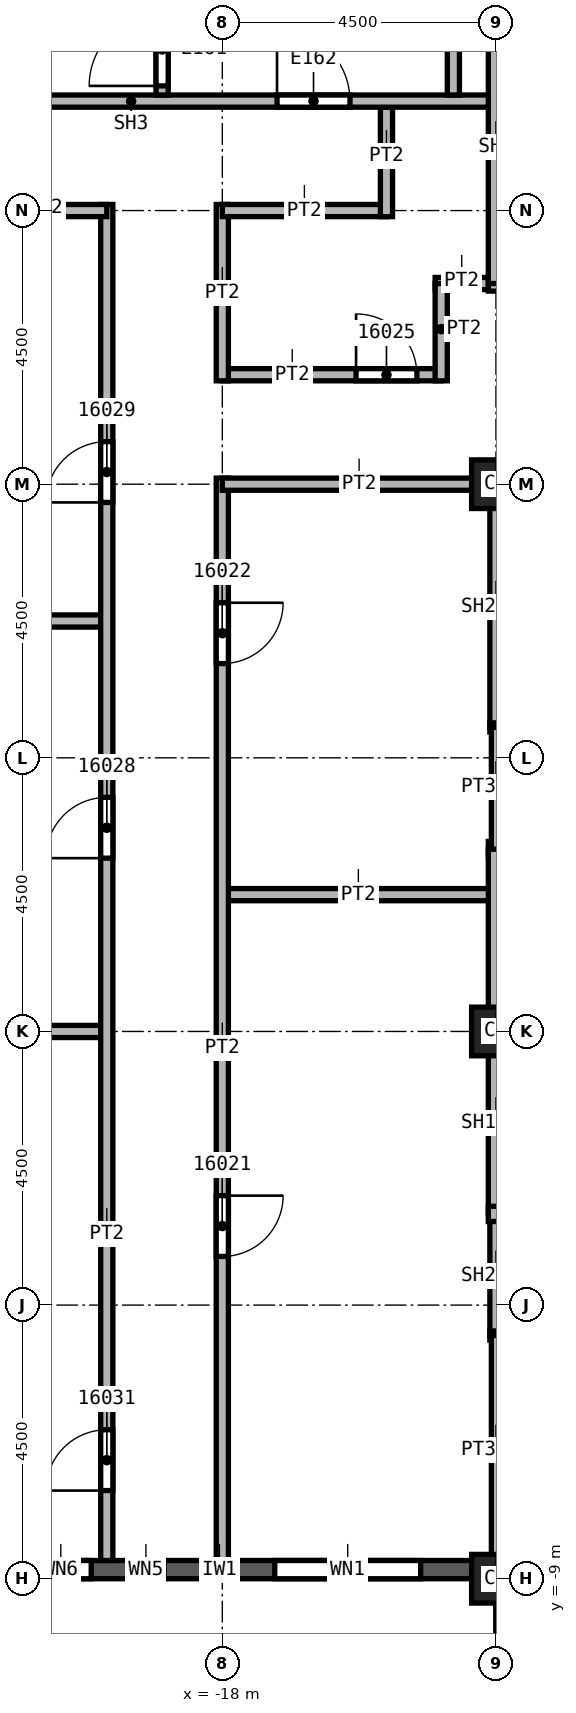
"""IFC4 building model, lengths in metres.
Left out: names, types, materials, properties, quantities, classifications, styles, units other than length and angle.
Written with IfcOpenShell. Run it as: python <this file> out.ifc"""

import sys

from ifc_helpers import new_model, si_unit, direction, frame, frame_2d, origin, origin_2d, place, context, subcontext, project, spatial, rectangle, extrude, element, fill, save


model = new_model("IFC4")
c1 = context("Model", 3, precision=1e-05, world=origin(), true_north=direction((0.0, 1.0)))
c2 = subcontext(c1, "Body", "Model", "MODEL_VIEW")
j1 = project(units=[si_unit("LENGTHUNIT", "METRE"), si_unit("PLANEANGLEUNIT", "RADIAN")], contexts=[c1])
p1 = place(None, origin())
s1 = spatial("IfcSite", under=j1, at=p1, CompositionType="ELEMENT")
p2 = place(p1, origin())
s2 = spatial("IfcBuilding", under=s1, at=p2, CompositionType="ELEMENT")
p3 = place(p2, frame((0.0, 0.0, 242.0)))
s3 = spatial("IfcBuildingStorey", under=s2, at=p3, CompositionType="ELEMENT", Elevation=242.0)
for number, where, z_axis, x_axis in (
    (1, (-13.5, 0.0, 0.0), (0.0, 0.0, 1.0), (1.0, 0.0, 0.0)),
    (2, (-13.5, 9.0, 0.0), (0.0, 0.0, 1.0), (1.0, 0.0, 0.0)),
    (3, (-13.5, -9.0, 0.0), (0.0, 0.0, 1.0), (1.0, 0.0, 0.0)),
):
    element("IfcColumn", number, at=place(p3, frame(where, z_axis=z_axis, x_axis=x_axis)), inside=s3, PredefinedType="COLUMN", context=c2, shape_type="SweptSolid", body=[
        extrude(rectangle(XDim=0.8, YDim=0.8, at=origin_2d()), origin(), (0.0, 0.0, 1.0), 3.72),
    ])
p4 = place(p3, frame((-13.35, -9.025, 0.0), z_axis=(0.0, 0.0, 1.0), x_axis=(0.0, -1.0, 0.0)))
e4 = element("IfcWall", 4, at=p4, inside=s3, PredefinedType="SOLIDWALL", context=c2, shape_type="SweptSolid", body=[
    extrude(rectangle(XDim=8.525, YDim=0.3, at=frame_2d((4.263, 0.0))), origin(), (0.0, 0.0, 1.0), 3.12),
])
p5 = place(p4, frame((0.462, 0.0, 0.8)))
e5 = element("IfcOpeningElement", 5, at=p5, cuts=e4, PredefinedType="OPENING", context=c2, shape_type="SweptSolid", body=[
    extrude(rectangle(XDim=2.4, YDim=1.95, at=frame_2d((1.2, 0.975))), frame((0.0, 0.15, 0.0), z_axis=(0.0, -1.0, 0.0), x_axis=(1.0, 0.0, 0.0)), (0.0, 0.0, 1.0), 0.3),
])
p6 = place(p4, frame((4.538, 0.0, 0.8)))
e6 = element("IfcOpeningElement", 6, at=p6, cuts=e4, PredefinedType="OPENING", context=c2, shape_type="SweptSolid", body=[
    extrude(rectangle(XDim=2.4, YDim=1.95, at=frame_2d((1.2, 0.975))), frame((0.0, 0.15, 0.0), z_axis=(0.0, -1.0, 0.0), x_axis=(1.0, 0.0, 0.0)), (0.0, 0.0, 1.0), 0.3),
])
p7 = place(p3, frame((-22.05, -8.85, 0.0), z_axis=(0.0, 0.0, 1.0), x_axis=(1.0, 0.0, 0.0)))
e7 = element("IfcWall", 7, at=p7, inside=s3, PredefinedType="SOLIDWALL", context=c2, shape_type="SweptSolid", body=[
    extrude(rectangle(XDim=8.525, YDim=0.3, at=frame_2d((4.263, 0.0))), origin(), (0.0, 0.0, 1.0), 3.12),
])
p8 = place(p7, frame((4.913, 0.0, 0.8)))
e8 = element("IfcOpeningElement", 8, at=p8, cuts=e7, PredefinedType="OPENING", context=c2, shape_type="SweptSolid", body=[
    extrude(rectangle(XDim=2.4, YDim=1.95, at=frame_2d((1.2, 0.975))), frame((0.0, 0.15, 0.0), z_axis=(0.0, -1.0, 0.0), x_axis=(1.0, 0.0, 0.0)), (0.0, 0.0, 1.0), 0.3),
])
p9 = place(p7, frame((0.894, 0.0, 0.8)))
e9 = element("IfcOpeningElement", 9, at=p9, cuts=e7, PredefinedType="OPENING", context=c2, shape_type="SweptSolid", body=[
    extrude(rectangle(XDim=1.0, YDim=1.95, at=frame_2d((0.5, 0.975))), frame((0.0, 0.15, 0.0), z_axis=(0.0, -1.0, 0.0), x_axis=(1.0, 0.0, 0.0)), (0.0, 0.0, 1.0), 0.3),
])
p10 = place(p7, frame((2.494, 0.0, 0.8)))
e10 = element("IfcOpeningElement", 10, at=p10, cuts=e7, PredefinedType="OPENING", context=c2, shape_type="SweptSolid", body=[
    extrude(rectangle(XDim=0.6, YDim=1.95, at=frame_2d((0.3, 0.975))), frame((0.0, 0.15, 0.0), z_axis=(0.0, -1.0, 0.0), x_axis=(1.0, 0.0, 0.0)), (0.0, 0.0, 1.0), 0.3),
])
p11 = place(p3, frame((-24.5, 6.75, 0.0), z_axis=(0.0, 0.0, 1.0), x_axis=(1.0, 0.0, 0.0)))
e11 = element("IfcWall", 11, at=p11, inside=s3, PredefinedType="PARTITIONING", context=c2, shape_type="SweptSolid", body=[
    extrude(rectangle(XDim=4.6, YDim=0.2, at=frame_2d((2.3, 0.0))), origin(), (0.0, 0.0, 1.0), 3.72),
])
p12 = place(p3, frame((-19.9, 0.0, 0.0), z_axis=(0.0, 0.0, 1.0), x_axis=(-1.0, 0.0, 0.0)))
e12 = element("IfcWall", 12, at=p12, inside=s3, PredefinedType="PARTITIONING", context=c2, shape_type="SweptSolid", body=[
    extrude(rectangle(XDim=6.65, YDim=0.2, at=frame_2d((3.325, 0.0))), origin(), (0.0, 0.0, 1.0), 3.72),
])
p13 = place(p3, frame((-19.9, -8.7, 0.0), z_axis=(0.0, 0.0, 1.0), x_axis=(0.0, 1.0, 0.0)))
e13 = element("IfcWall", 13, at=p13, inside=s3, PredefinedType="PARTITIONING", context=c2, shape_type="SweptSolid", body=[
    extrude(rectangle(XDim=22.3, YDim=0.2, at=frame_2d((11.15, 0.0))), origin(), (0.0, 0.0, 1.0), 3.72),
])
p14 = place(p13, frame((11.55, 0.0, 0.0)))
e14 = element("IfcOpeningElement", 14, at=p14, cuts=e13, PredefinedType="OPENING", context=c2, shape_type="SweptSolid", body=[
    extrude(rectangle(XDim=1.0, YDim=2.1, at=frame_2d((0.5, 1.05))), frame((0.0, 0.1, 0.0), z_axis=(0.0, -1.0, 0.0), x_axis=(1.0, 0.0, 0.0)), (0.0, 0.0, 1.0), 0.2),
])
p15 = place(p13, frame((17.4, 0.0, 0.0)))
e15 = element("IfcOpeningElement", 15, at=p15, cuts=e13, PredefinedType="OPENING", context=c2, shape_type="SweptSolid", body=[
    extrude(rectangle(XDim=1.0, YDim=2.1, at=frame_2d((0.5, 1.05))), frame((0.0, 0.1, 0.0), z_axis=(0.0, -1.0, 0.0), x_axis=(1.0, 0.0, 0.0)), (0.0, 0.0, 1.0), 0.2),
])
p16 = place(p13, frame((1.15, 0.0, 0.0)))
e16 = element("IfcOpeningElement", 16, at=p16, cuts=e13, PredefinedType="OPENING", context=c2, shape_type="SweptSolid", body=[
    extrude(rectangle(XDim=1.0, YDim=2.1, at=frame_2d((0.5, 1.05))), frame((0.0, 0.1, 0.0), z_axis=(0.0, -1.0, 0.0), x_axis=(1.0, 0.0, 0.0)), (0.0, 0.0, 1.0), 0.2),
])
p17 = place(p3, frame((-19.9, 13.5, 0.0), z_axis=(0.0, 0.0, 1.0), x_axis=(-1.0, 0.0, 0.0)))
e17 = element("IfcWall", 17, at=p17, inside=s3, PredefinedType="PARTITIONING", context=c2, shape_type="SweptSolid", body=[
    extrude(rectangle(XDim=2.1, YDim=0.2, at=frame_2d((1.05, 0.0))), origin(), (0.0, 0.0, 1.0), 3.72),
])
p18 = place(p3, frame((-18.0, 2.25, 0.0), z_axis=(0.0, 0.0, 1.0), x_axis=(1.0, 0.0, 0.0)))
e18 = element("IfcWall", 18, at=p18, inside=s3, PredefinedType="PARTITIONING", context=c2, shape_type="SweptSolid", body=[
    extrude(rectangle(XDim=4.5, YDim=0.2, at=frame_2d((2.25, 0.0))), origin(), (0.0, 0.0, 1.0), 3.72),
])
p19 = place(p3, frame((-18.0, 9.1, 0.0), z_axis=(0.0, 0.0, 1.0), x_axis=(0.0, -1.0, 0.0)))
e19 = element("IfcWall", 19, at=p19, inside=s3, PredefinedType="PARTITIONING", context=c2, shape_type="SweptSolid", body=[
    extrude(rectangle(XDim=17.8, YDim=0.2, at=frame_2d((8.9, 0.0))), origin(), (0.0, 0.0, 1.0), 3.72),
])
p20 = place(p19, frame((11.8, 0.0, 0.0)))
e20 = element("IfcOpeningElement", 20, at=p20, cuts=e19, PredefinedType="OPENING", context=c2, shape_type="SweptSolid", body=[
    extrude(rectangle(XDim=1.0, YDim=2.1, at=frame_2d((0.5, 1.05))), frame((0.0, 0.1, 0.0), z_axis=(0.0, -1.0, 0.0), x_axis=(1.0, 0.0, 0.0)), (0.0, 0.0, 1.0), 0.2),
])
p21 = place(p19, frame((2.05, 0.0, 0.0)))
e21 = element("IfcOpeningElement", 21, at=p21, cuts=e19, PredefinedType="OPENING", context=c2, shape_type="SweptSolid", body=[
    extrude(rectangle(XDim=1.0, YDim=2.1, at=frame_2d((0.5, 1.05))), frame((0.0, 0.1, 0.0), z_axis=(0.0, -1.0, 0.0), x_axis=(1.0, 0.0, 0.0)), (0.0, 0.0, 1.0), 0.2),
])
p22 = place(p3, frame((-18.0, 10.8, 0.0), z_axis=(0.0, 0.0, 1.0), x_axis=(1.0, 0.0, 0.0)))
e22 = element("IfcWall", 22, at=p22, inside=s3, PredefinedType="PARTITIONING", context=c2, shape_type="SweptSolid", body=[
    extrude(rectangle(XDim=3.6, YDim=0.2, at=frame_2d((1.8, 0.0))), origin(), (0.0, 0.0, 1.0), 3.72),
])
p23 = place(p22, frame((2.2, 0.0, 0.0)))
e23 = element("IfcOpeningElement", 23, at=p23, cuts=e22, PredefinedType="OPENING", context=c2, shape_type="SweptSolid", body=[
    extrude(rectangle(XDim=1.0, YDim=2.1, at=frame_2d((0.5, 1.05))), frame((0.0, 0.1, 0.0), z_axis=(0.0, -1.0, 0.0), x_axis=(1.0, 0.0, 0.0)), (0.0, 0.0, 1.0), 0.2),
])
p24 = place(p3, frame((-18.0, 13.6, 0.0), z_axis=(0.0, 0.0, 1.0), x_axis=(0.0, -1.0, 0.0)))
e24 = element("IfcWall", 24, at=p24, inside=s3, PredefinedType="PARTITIONING", context=c2, shape_type="SweptSolid", body=[
    extrude(rectangle(XDim=2.9, YDim=0.2, at=frame_2d((1.45, 0.0))), origin(), (0.0, 0.0, 1.0), 3.72),
])
p25 = place(p3, frame((-15.3, 13.5, 0.0), z_axis=(0.0, 0.0, 1.0), x_axis=(-1.0, 0.0, 0.0)))
e25 = element("IfcWall", 25, at=p25, inside=s3, PredefinedType="PARTITIONING", context=c2, shape_type="SweptSolid", body=[
    extrude(rectangle(XDim=2.7, YDim=0.2, at=frame_2d((1.35, 0.0))), origin(), (0.0, 0.0, 1.0), 3.72),
])
p26 = place(p3, frame((-15.3, 15.2, 0.0), z_axis=(0.0, 0.0, 1.0), x_axis=(0.0, -1.0, 0.0)))
e26 = element("IfcWall", 26, at=p26, inside=s3, PredefinedType="PARTITIONING", context=c2, shape_type="SweptSolid", body=[
    extrude(rectangle(XDim=1.8, YDim=0.2, at=frame_2d((0.9, 0.0))), origin(), (0.0, 0.0, 1.0), 3.72),
])
p27 = place(p3, frame((-14.5, 12.3, 0.0), z_axis=(0.0, 0.0, 1.0), x_axis=(1.0, 0.0, 0.0)))
e27 = element("IfcWall", 27, at=p27, inside=s3, PredefinedType="PARTITIONING", context=c2, shape_type="SweptSolid", body=[
    extrude(rectangle(XDim=1.125, YDim=0.2, at=frame_2d((0.562, 0.0))), origin(), (0.0, 0.0, 1.0), 3.72),
])
p28 = place(p3, frame((-13.5, 9.0, 0.0), z_axis=(0.0, 0.0, 1.0), x_axis=(-1.0, 0.0, 0.0)))
e28 = element("IfcWall", 28, at=p28, inside=s3, PredefinedType="PARTITIONING", context=c2, shape_type="SweptSolid", body=[
    extrude(rectangle(XDim=4.5, YDim=0.2, at=frame_2d((2.25, 0.0))), origin(), (0.0, 0.0, 1.0), 3.72),
])
p29 = place(p3, frame((-14.4, 10.7, 0.0), z_axis=(0.0, 0.0, 1.0), x_axis=(0.0, 1.0, 0.0)))
e29 = element("IfcWall", 29, at=p29, inside=s3, PredefinedType="PARTITIONING", context=c2, shape_type="SweptSolid", body=[
    extrude(rectangle(XDim=1.6, YDim=0.2, at=frame_2d((0.8, 0.0))), origin(), (0.0, 0.0, 1.0), 3.72),
])
p30 = place(p3, frame((-13.6, 9.0, 0.0), z_axis=(0.0, 0.0, 1.0), x_axis=(1.0, 0.0, 0.0)))
e30 = element("IfcWall", 30, at=p30, inside=s3, PredefinedType="SOLIDWALL", context=c2, shape_type="SweptSolid", body=[
    extrude(rectangle(XDim=3.1, YDim=0.2, at=frame_2d((1.55, 0.0))), origin(), (0.0, 0.0, 1.0), 3.042),
])
p31 = place(p3, frame((-13.5, -5.0, 0.0), z_axis=(0.0, 0.0, 1.0), x_axis=(0.0, 1.0, 0.0)))
e31 = element("IfcWall", 31, at=p31, inside=s3, PredefinedType="SOLIDWALL", context=c2, shape_type="SweptSolid", body=[
    extrude(rectangle(XDim=2.0, YDim=0.2, at=frame_2d((1.0, 0.0))), origin(), (0.0, 0.0, 1.0), 3.042),
])
p32 = place(p3, frame((-13.5, 5.0, 0.0), z_axis=(0.0, 0.0, 1.0), x_axis=(0.0, 1.0, 0.0)))
e32 = element("IfcWall", 32, at=p32, inside=s3, PredefinedType="SOLIDWALL", context=c2, shape_type="SweptSolid", body=[
    extrude(rectangle(XDim=4.1, YDim=0.2, at=frame_2d((2.05, 0.0))), origin(), (0.0, 0.0, 1.0), 3.042),
])
p33 = place(p3, frame((-13.625, 0.0, 0.0), z_axis=(0.0, 0.0, 1.0), x_axis=(1.0, 0.0, 0.0)))
e33 = element("IfcWall", 33, at=p33, inside=s3, PredefinedType="SOLIDWALL", context=c2, shape_type="SweptSolid", body=[
    extrude(rectangle(XDim=3.125, YDim=0.25, at=frame_2d((1.562, 0.0))), origin(), (0.0, 0.0, 1.0), 3.72),
])
p34 = place(p3, frame((-13.625, 3.0, 0.0), z_axis=(0.0, 0.0, 1.0), x_axis=(1.0, 0.0, 0.0)))
e34 = element("IfcWall", 34, at=p34, inside=s3, PredefinedType="SOLIDWALL", context=c2, shape_type="SweptSolid", body=[
    extrude(rectangle(XDim=9.25, YDim=0.25, at=frame_2d((4.625, 0.0))), origin(), (0.0, 0.0, 1.0), 3.72),
])
p35 = place(p34, frame((3.25, 0.0, 0.0)))
e35 = element("IfcOpeningElement", 35, at=p35, cuts=e34, PredefinedType="OPENING", context=c2, shape_type="SweptSolid", body=[
    extrude(rectangle(XDim=1.1, YDim=2.1, at=frame_2d((0.55, 1.05))), frame((0.0, 0.125, 0.0), z_axis=(0.0, -1.0, 0.0), x_axis=(1.0, 0.0, 0.0)), (0.0, 0.0, 1.0), 0.25),
])
p36 = place(p3, frame((-13.5, -3.0, 0.0), z_axis=(0.0, 0.0, 1.0), x_axis=(0.0, 1.0, 0.0)))
e36 = element("IfcWall", 36, at=p36, inside=s3, PredefinedType="SOLIDWALL", context=c2, shape_type="SweptSolid", body=[
    extrude(rectangle(XDim=6.0, YDim=0.25, at=frame_2d((3.0, 0.0))), origin(), (0.0, 0.0, 1.0), 3.042),
])
p37 = place(p3, frame((-13.625, -3.0, 0.0), z_axis=(0.0, 0.0, 1.0), x_axis=(1.0, 0.0, 0.0)))
e37 = element("IfcWall", 37, at=p37, inside=s3, PredefinedType="SOLIDWALL", context=c2, shape_type="SweptSolid", body=[
    extrude(rectangle(XDim=6.125, YDim=0.25, at=frame_2d((3.062, 0.0))), origin(), (0.0, 0.0, 1.0), 3.72),
])
p38 = place(p37, frame((3.25, 0.0, 0.0)))
e38 = element("IfcOpeningElement", 38, at=p38, cuts=e37, PredefinedType="OPENING", context=c2, shape_type="SweptSolid", body=[
    extrude(rectangle(XDim=1.1, YDim=2.1, at=frame_2d((0.55, 1.05))), frame((0.0, 0.125, 0.0), z_axis=(0.0, -1.0, 0.0), x_axis=(1.0, 0.0, 0.0)), (0.0, 0.0, 1.0), 0.25),
])
p39 = place(p3, frame((-13.625, 12.3, 0.0), z_axis=(0.0, 0.0, 1.0), x_axis=(1.0, 0.0, 0.0)))
e39 = element("IfcWall", 39, at=p39, inside=s3, PredefinedType="SOLIDWALL", context=c2, shape_type="SweptSolid", body=[
    extrude(rectangle(XDim=9.25, YDim=0.25, at=frame_2d((4.625, 0.0))), origin(), (0.0, 0.0, 1.0), 3.72),
])
p40 = place(p39, frame((0.85, 0.0, 0.0)))
e40 = element("IfcOpeningElement", 40, at=p40, cuts=e39, PredefinedType="OPENING", context=c2, shape_type="SweptSolid", body=[
    extrude(rectangle(XDim=1.2, YDim=2.1, at=frame_2d((0.6, 1.05))), frame((0.0, 0.125, 0.0), z_axis=(0.0, -1.0, 0.0), x_axis=(1.0, 0.0, 0.0)), (0.0, 0.0, 1.0), 0.25),
])
p41 = place(p3, frame((-13.5, 12.3, 0.0), z_axis=(0.0, 0.0, 1.0), x_axis=(0.0, 1.0, 0.0)))
e41 = element("IfcWall", 41, at=p41, inside=s3, PredefinedType="SOLIDWALL", context=c2, shape_type="SweptSolid", body=[
    extrude(rectangle(XDim=4.5, YDim=0.25, at=frame_2d((2.25, 0.0))), origin(), (0.0, 0.0, 1.0), 3.72),
])
for number, where, z_axis, x_axis in (
    (42, (-13.6, -5.0, 0.0), (0.0, 0.0, 1.0), (1.0, 0.0, 0.0)),
    (43, (-13.6, 5.0, 0.0), (0.0, 0.0, 1.0), (1.0, 0.0, 0.0)),
):
    element("IfcWall", number, at=place(p3, frame(where, z_axis=z_axis, x_axis=x_axis)), inside=s3, PredefinedType="PARTITIONING", context=c2, shape_type="SweptSolid", body=[
        extrude(rectangle(XDim=3.1, YDim=0.15, at=frame_2d((1.55, 0.0))), origin(), (0.0, 0.0, 1.0), 3.72),
    ])
p42 = place(p3, frame((-13.5, -9.0, 0.0), z_axis=(0.0, 0.0, 1.0), x_axis=(0.0, 1.0, 0.0)))
e44 = element("IfcWall", 44, at=p42, inside=s3, PredefinedType="PARTITIONING", context=c2, shape_type="SweptSolid", body=[
    extrude(rectangle(XDim=4.0, YDim=0.15, at=frame_2d((2.0, 0.0))), origin(), (0.0, 0.0, 1.0), 3.042),
])
p43 = place(p3, frame((-13.5, 3.0, 0.0), z_axis=(0.0, 0.0, 1.0), x_axis=(0.0, 1.0, 0.0)))
e45 = element("IfcWall", 45, at=p43, inside=s3, PredefinedType="PARTITIONING", context=c2, shape_type="SweptSolid", body=[
    extrude(rectangle(XDim=2.0, YDim=0.15, at=frame_2d((1.0, 0.0))), origin(), (0.0, 0.0, 1.0), 3.042),
])
p44 = place(p3, frame((-10.5, -9.0, 0.0), z_axis=(0.0, 0.0, 1.0), x_axis=(-1.0, 0.0, 0.0)))
e46 = element("IfcWall", 46, at=p44, inside=s3, PredefinedType="PARTITIONING", context=c2, shape_type="SweptSolid", body=[
    extrude(rectangle(XDim=3.025, YDim=0.15, at=frame_2d((1.512, 0.0))), origin(), (0.0, 0.0, 1.0), 3.042),
])
p45 = place(p3, frame((-21.9, 15.3, 0.0), z_axis=(0.0, 0.0, 1.0), x_axis=(1.0, 0.0, 0.0)))
e47 = element("IfcWall", 47, at=p45, inside=s3, PredefinedType="SOLIDWALL", context=c2, shape_type="SweptSolid", body=[
    extrude(rectangle(XDim=8.275, YDim=0.2, at=frame_2d((4.137, 0.0))), origin(), (0.0, 0.0, 1.0), 3.72),
])
p46 = place(p45, frame((4.8, 0.0, 0.0)))
e48 = element("IfcOpeningElement", 48, at=p46, cuts=e47, PredefinedType="OPENING", context=c2, shape_type="SweptSolid", body=[
    extrude(rectangle(XDim=1.2, YDim=2.1, at=frame_2d((0.6, 1.05))), frame((0.0, 0.1, 0.0), z_axis=(0.0, -1.0, 0.0), x_axis=(1.0, 0.0, 0.0)), (0.0, 0.0, 1.0), 0.2),
])
p47 = place(p3, frame((-14.2, 15.4, 0.0), z_axis=(0.0, 0.0, 1.0), x_axis=(0.0, 1.0, 0.0)))
e49 = element("IfcWall", 49, at=p47, inside=s3, PredefinedType="SOLIDWALL", context=c2, shape_type="SweptSolid", body=[
    extrude(rectangle(XDim=5.9, YDim=0.2, at=frame_2d((2.95, 0.0))), origin(), (0.0, 0.0, 1.0), 3.72),
])
p48 = place(p3, frame((-18.99, 15.4, 0.0), z_axis=(0.0, 0.0, 1.0), x_axis=(0.0, 1.0, 0.0)))
e50 = element("IfcWall", 50, at=p48, inside=s3, PredefinedType="SOLIDWALL", context=c2, shape_type="SweptSolid", body=[
    extrude(rectangle(XDim=5.9, YDim=0.2, at=frame_2d((2.95, 0.0))), origin(), (0.0, 0.0, 1.0), 3.72),
])
p49 = place(p48, frame((0.15, 0.0, 0.0)))
e51 = element("IfcOpeningElement", 51, at=p49, cuts=e50, PredefinedType="OPENING", context=c2, shape_type="SweptSolid", body=[
    extrude(rectangle(XDim=1.2, YDim=2.1, at=frame_2d((0.6, 1.05))), frame((0.0, 0.1, 0.0), z_axis=(0.0, -1.0, 0.0), x_axis=(1.0, 0.0, 0.0)), (0.0, 0.0, 1.0), 0.2),
])
p50 = place(p8, origin())
e52 = element("IfcWindow", 52, at=p50, inside=s3, PartitioningType="SINGLE_PANEL", PredefinedType="WINDOW", context=c2, shape_type="SweptSolid", body=[
    extrude(rectangle(XDim=2.4, YDim=1.95, at=frame_2d((1.2, 0.975))), frame((0.0, 0.03, 0.0), z_axis=(0.0, -1.0, 0.0), x_axis=(1.0, 0.0, 0.0)), (0.0, 0.0, 1.0), 0.06),
])
fill(e8, e52)
p51 = place(p20, origin())
e53 = element("IfcDoor", 53, at=p51, inside=s3, OperationType="SINGLE_SWING_RIGHT", PredefinedType="DOOR", context=c2, shape_type="SweptSolid", body=[
    extrude(rectangle(XDim=1.0, YDim=2.1, at=frame_2d((0.5, 1.05))), frame((0.0, 0.025, 0.0), z_axis=(0.0, -1.0, 0.0), x_axis=(1.0, 0.0, 0.0)), (0.0, 0.0, 1.0), 0.05),
])
fill(e20, e53)
p52 = place(p21, origin())
e54 = element("IfcDoor", 54, at=p52, inside=s3, OperationType="SINGLE_SWING_LEFT", PredefinedType="DOOR", context=c2, shape_type="SweptSolid", body=[
    extrude(rectangle(XDim=1.0, YDim=2.1, at=frame_2d((0.5, 1.05))), frame((0.0, 0.025, 0.0), z_axis=(0.0, -1.0, 0.0), x_axis=(1.0, 0.0, 0.0)), (0.0, 0.0, 1.0), 0.05),
])
fill(e21, e54)
p53 = place(p23, origin())
e55 = element("IfcDoor", 55, at=p53, inside=s3, OperationType="SINGLE_SWING_RIGHT", PredefinedType="DOOR", context=c2, shape_type="SweptSolid", body=[
    extrude(rectangle(XDim=1.0, YDim=2.1, at=frame_2d((0.5, 1.05))), frame((0.0, 0.025, 0.0), z_axis=(0.0, -1.0, 0.0), x_axis=(1.0, 0.0, 0.0)), (0.0, 0.0, 1.0), 0.05),
])
fill(e23, e55)
p54 = place(p14, origin())
e56 = element("IfcDoor", 56, at=p54, inside=s3, OperationType="SINGLE_SWING_LEFT", PredefinedType="DOOR", context=c2, shape_type="SweptSolid", body=[
    extrude(rectangle(XDim=1.0, YDim=2.1, at=frame_2d((0.5, 1.05))), frame((0.0, 0.025, 0.0), z_axis=(0.0, -1.0, 0.0), x_axis=(1.0, 0.0, 0.0)), (0.0, 0.0, 1.0), 0.05),
])
fill(e14, e56)
p55 = place(p15, origin())
e57 = element("IfcDoor", 57, at=p55, inside=s3, OperationType="SINGLE_SWING_RIGHT", PredefinedType="DOOR", context=c2, shape_type="SweptSolid", body=[
    extrude(rectangle(XDim=1.0, YDim=2.1, at=frame_2d((0.5, 1.05))), frame((0.0, 0.025, 0.0), z_axis=(0.0, -1.0, 0.0), x_axis=(1.0, 0.0, 0.0)), (0.0, 0.0, 1.0), 0.05),
])
fill(e15, e57)
p56 = place(p16, origin())
e58 = element("IfcDoor", 58, at=p56, inside=s3, OperationType="SINGLE_SWING_RIGHT", PredefinedType="DOOR", context=c2, shape_type="SweptSolid", body=[
    extrude(rectangle(XDim=1.0, YDim=2.1, at=frame_2d((0.5, 1.05))), frame((0.0, 0.025, 0.0), z_axis=(0.0, -1.0, 0.0), x_axis=(1.0, 0.0, 0.0)), (0.0, 0.0, 1.0), 0.05),
])
fill(e16, e58)
p57 = place(p49, origin())
e59 = element("IfcDoor", 59, at=p57, inside=s3, OperationType="SINGLE_SWING_LEFT", PredefinedType="DOOR", context=c2, shape_type="SweptSolid", body=[
    extrude(rectangle(XDim=1.2, YDim=2.1, at=frame_2d((0.6, 1.05))), frame((0.0, 0.025, 0.0), z_axis=(0.0, -1.0, 0.0), x_axis=(1.0, 0.0, 0.0)), (0.0, 0.0, 1.0), 0.05),
])
fill(e51, e59)
p58 = place(p46, origin())
e60 = element("IfcDoor", 60, at=p58, inside=s3, OperationType="SINGLE_SWING_RIGHT", PredefinedType="DOOR", context=c2, shape_type="SweptSolid", body=[
    extrude(rectangle(XDim=1.2, YDim=2.1, at=frame_2d((0.6, 1.05))), frame((0.0, 0.025, 0.0), z_axis=(0.0, -1.0, 0.0), x_axis=(1.0, 0.0, 0.0)), (0.0, 0.0, 1.0), 0.05),
])
fill(e48, e60)
p59 = place(p9, origin())
e61 = element("IfcWindow", 61, at=p59, inside=s3, PartitioningType="SINGLE_PANEL", PredefinedType="WINDOW", context=c2, shape_type="SweptSolid", body=[
    extrude(rectangle(XDim=1.0, YDim=1.95, at=frame_2d((0.5, 0.975))), frame((0.0, 0.03, 0.0), z_axis=(0.0, -1.0, 0.0), x_axis=(1.0, 0.0, 0.0)), (0.0, 0.0, 1.0), 0.06),
])
fill(e9, e61)
p60 = place(p10, origin())
e62 = element("IfcWindow", 62, at=p60, inside=s3, PartitioningType="SINGLE_PANEL", PredefinedType="WINDOW", context=c2, shape_type="SweptSolid", body=[
    extrude(rectangle(XDim=0.6, YDim=1.95, at=frame_2d((0.3, 0.975))), frame((0.0, 0.03, 0.0), z_axis=(0.0, -1.0, 0.0), x_axis=(1.0, 0.0, 0.0)), (0.0, 0.0, 1.0), 0.06),
])
fill(e10, e62)
save(model, sys.argv[1])
